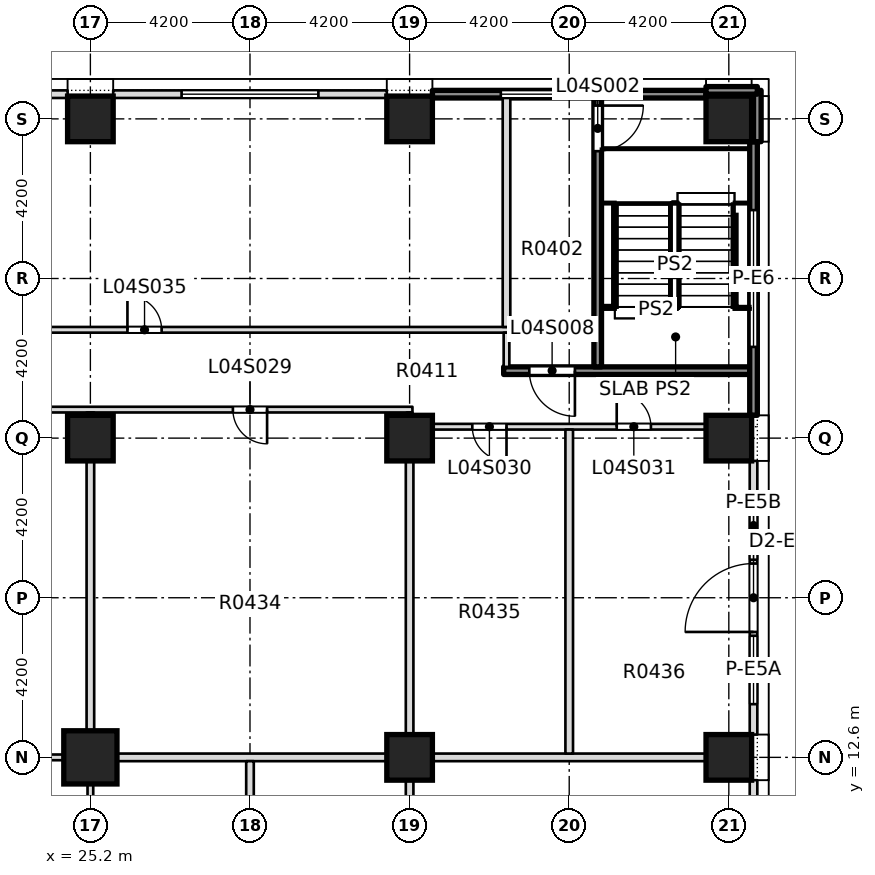
"""IFC4 building model, lengths in metres.
Left out: names, types, materials, properties, quantities, classifications, styles, units other than length and angle.
Written with IfcOpenShell. Run it as: python <this file> out.ifc"""

import sys

from ifc_helpers import new_model, si_unit, direction, frame, frame_2d, origin, origin_2d, place, context, subcontext, project, spatial, rectangle, extrude, element, fill, save


model = new_model("IFC4")
c1 = context("Model", 3, precision=1e-05, world=origin(), true_north=direction((0.0, 1.0)))
c2 = subcontext(c1, "Body", "Model", "MODEL_VIEW")
j1 = project(units=[si_unit("LENGTHUNIT", "METRE"), si_unit("PLANEANGLEUNIT", "RADIAN")], contexts=[c1])
p1 = place(None, origin())
s1 = spatial("IfcSite", under=j1, at=p1, CompositionType="ELEMENT")
p2 = place(p1, origin())
s2 = spatial("IfcBuilding", under=s1, at=p2, CompositionType="ELEMENT")
p3 = place(p2, frame((0.0, 0.0, 25.0)))
s3 = spatial("IfcBuildingStorey", under=s2, at=p3, CompositionType="ELEMENT", Elevation=25.0)
p4 = place(p3, frame((25.2, 12.6, -0.4), z_axis=(0.0, 0.0, 1.0), x_axis=(1.0, 0.0, 0.0)))
e1 = element("IfcColumn", 1, at=p4, inside=s3, PredefinedType="COLUMN", context=c2, shape_type="SweptSolid", body=[
    extrude(rectangle(XDim=1.4, YDim=1.4, at=origin_2d()), origin(), (0.0, 0.0, 1.0), 5.0),
])
for number, where, z_axis, x_axis in (
    (2, (33.6, 12.6, 0.0), (0.0, 0.0, 1.0), (1.0, 0.0, 0.0)),
    (3, (42.0, 12.6, 0.0), (0.0, 0.0, 1.0), (1.0, 0.0, 0.0)),
    (4, (25.2, 21.0, 0.0), (0.0, 0.0, 1.0), (1.0, 0.0, 0.0)),
    (5, (33.6, 21.0, 0.0), (0.0, 0.0, 1.0), (1.0, 0.0, 0.0)),
    (6, (42.0, 21.0, 0.0), (0.0, 0.0, 1.0), (1.0, 0.0, 0.0)),
    (7, (25.2, 29.4, 0.0), (0.0, 0.0, 1.0), (1.0, 0.0, 0.0)),
    (8, (33.6, 29.4, 0.0), (0.0, 0.0, 1.0), (1.0, 0.0, 0.0)),
    (9, (42.0, 29.4, 0.0), (0.0, 0.0, 1.0), (1.0, 0.0, 0.0)),
):
    element("IfcColumn", number, at=place(p3, frame(where, z_axis=z_axis, x_axis=x_axis)), inside=s3, PredefinedType="COLUMN", context=c2, shape_type="SweptSolid", body=[
        extrude(rectangle(XDim=1.2, YDim=1.2, at=origin_2d()), origin(), (0.0, 0.0, 1.0), 5.0),
    ])
p5 = place(p3, frame((16.725, 12.6, 0.0), z_axis=(0.0, 0.0, 1.0), x_axis=(1.0, 0.0, 0.0)))
e10 = element("IfcWall", 10, at=p5, inside=s3, PredefinedType="PARTITIONING", context=c2, shape_type="SweptSolid", body=[
    extrude(rectangle(XDim=8.575, YDim=0.15, at=frame_2d((4.288, 0.0))), origin(), (0.0, 0.0, 1.0), 4.6),
])
p6 = place(p3, frame((25.1, 12.6, 0.0), z_axis=(0.0, 0.0, 1.0), x_axis=(1.0, 0.0, 0.0)))
e11 = element("IfcWall", 11, at=p6, inside=s3, PredefinedType="PARTITIONING", context=c2, shape_type="SweptSolid", body=[
    extrude(rectangle(XDim=17.45, YDim=0.2, at=frame_2d((8.725, 0.0))), origin(), (0.0, 0.0, 1.0), 4.6),
])
p7 = place(p3, frame((33.5, 21.3, 0.0), z_axis=(0.0, 0.0, 1.0), x_axis=(1.0, 0.0, 0.0)))
e12 = element("IfcWall", 12, at=p7, inside=s3, PredefinedType="PARTITIONING", context=c2, shape_type="SweptSolid", body=[
    extrude(rectangle(XDim=9.05, YDim=0.15, at=frame_2d((4.525, 0.0))), origin(), (0.0, 0.0, 1.0), 4.6),
])
p8 = place(p7, frame((1.75, 0.0, 0.0)))
e13 = element("IfcOpeningElement", 13, at=p8, cuts=e12, PredefinedType="OPENING", context=c2, shape_type="SweptSolid", body=[
    extrude(rectangle(XDim=0.9, YDim=2.1, at=frame_2d((0.45, 1.05))), frame((0.0, 0.085, 0.0), z_axis=(0.0, -1.0, 0.0), x_axis=(1.0, 0.0, 0.0)), (0.0, 0.0, 1.0), 0.17),
])
p9 = place(p7, frame((5.55, 0.0, 0.0)))
e14 = element("IfcOpeningElement", 14, at=p9, cuts=e12, PredefinedType="OPENING", context=c2, shape_type="SweptSolid", body=[
    extrude(rectangle(XDim=0.9, YDim=2.1, at=frame_2d((0.45, 1.05))), frame((0.0, 0.085, 0.0), z_axis=(0.0, -1.0, 0.0), x_axis=(1.0, 0.0, 0.0)), (0.0, 0.0, 1.0), 0.17),
])
p10 = place(p3, frame((12.601, 21.75, 0.0), z_axis=(0.0, 0.0, 1.0), x_axis=(1.0, 0.0, 0.0)))
e15 = element("IfcWall", 15, at=p10, inside=s3, PredefinedType="PARTITIONING", context=c2, shape_type="SweptSolid", body=[
    extrude(rectangle(XDim=21.074, YDim=0.15, at=frame_2d((10.537, 0.0))), origin(), (0.0, 0.0, 1.0), 4.6),
])
p11 = place(p10, frame((16.349, 0.0, 0.0)))
e16 = element("IfcOpeningElement", 16, at=p11, cuts=e15, PredefinedType="OPENING", context=c2, shape_type="SweptSolid", body=[
    extrude(rectangle(XDim=0.9, YDim=2.1, at=frame_2d((0.45, 1.05))), frame((0.0, 0.085, 0.0), z_axis=(0.0, -1.0, 0.0), x_axis=(1.0, 0.0, 0.0)), (0.0, 0.0, 1.0), 0.17),
])
p12 = place(p3, frame((36.075, 22.775, 0.0), z_axis=(0.0, 0.0, 1.0), x_axis=(1.0, 0.0, 0.0)))
e17 = element("IfcWall", 17, at=p12, inside=s3, PredefinedType="SOLIDWALL", context=c2, shape_type="SweptSolid", body=[
    extrude(rectangle(XDim=6.475, YDim=0.2, at=frame_2d((3.238, 0.0))), origin(), (0.0, 0.0, 1.0), 4.6),
])
p13 = place(p12, frame((0.675, 0.0, 0.0)))
e18 = element("IfcOpeningElement", 18, at=p13, cuts=e17, PredefinedType="OPENING", context=c2, shape_type="SweptSolid", body=[
    extrude(rectangle(XDim=1.2, YDim=2.1, at=frame_2d((0.6, 1.05))), frame((0.0, 0.11, 0.0), z_axis=(0.0, -1.0, 0.0), x_axis=(1.0, 0.0, 0.0)), (0.0, 0.0, 1.0), 0.22),
])
p14 = place(p3, frame((8.65, 23.85, 0.0), z_axis=(0.0, 0.0, 1.0), x_axis=(1.0, 0.0, 0.0)))
e19 = element("IfcWall", 19, at=p14, inside=s3, PredefinedType="PARTITIONING", context=c2, shape_type="SweptSolid", body=[
    extrude(rectangle(XDim=27.6, YDim=0.15, at=frame_2d((13.8, 0.0))), origin(), (0.0, 0.0, 1.0), 4.6),
])
p15 = place(p14, frame((3.8, 0.0, 0.0)))
e20 = element("IfcOpeningElement", 20, at=p15, cuts=e19, PredefinedType="OPENING", context=c2, shape_type="SweptSolid", body=[
    extrude(rectangle(XDim=0.9, YDim=2.1, at=frame_2d((0.45, 1.05))), frame((0.0, 0.085, 0.0), z_axis=(0.0, -1.0, 0.0), x_axis=(1.0, 0.0, 0.0)), (0.0, 0.0, 1.0), 0.17),
])
p16 = place(p14, frame((17.525, 0.0, 0.0)))
e21 = element("IfcOpeningElement", 21, at=p16, cuts=e19, PredefinedType="OPENING", context=c2, shape_type="SweptSolid", body=[
    extrude(rectangle(XDim=0.9, YDim=2.1, at=frame_2d((0.45, 1.05))), frame((0.0, 0.085, 0.0), z_axis=(0.0, -1.0, 0.0), x_axis=(1.0, 0.0, 0.0)), (0.0, 0.0, 1.0), 0.17),
])
p17 = place(p3, frame((25.2, 2.175, 0.0), z_axis=(0.0, 0.0, 1.0), x_axis=(0.0, 1.0, 0.0)))
e22 = element("IfcWall", 22, at=p17, inside=s3, PredefinedType="PARTITIONING", context=c2, shape_type="SweptSolid", body=[
    extrude(rectangle(XDim=10.325, YDim=0.15, at=frame_2d((5.163, 0.0))), origin(), (0.0, 0.0, 1.0), 4.6),
])
p18 = place(p3, frame((25.2, 12.7, 0.0), z_axis=(0.0, 0.0, 1.0), x_axis=(0.0, 1.0, 0.0)))
e23 = element("IfcWall", 23, at=p18, inside=s3, PredefinedType="PARTITIONING", context=c2, shape_type="SweptSolid", body=[
    extrude(rectangle(XDim=8.975, YDim=0.2, at=frame_2d((4.488, 0.0))), origin(), (0.0, 0.0, 1.0), 4.6),
])
p19 = place(p3, frame((29.4, 2.175, 0.0), z_axis=(0.0, 0.0, 1.0), x_axis=(0.0, 1.0, 0.0)))
e24 = element("IfcWall", 24, at=p19, inside=s3, PredefinedType="PARTITIONING", context=c2, shape_type="SweptSolid", body=[
    extrude(rectangle(XDim=10.325, YDim=0.2, at=frame_2d((5.163, 0.0))), origin(), (0.0, 0.0, 1.0), 4.6),
])
p20 = place(p3, frame((33.6, 2.175, 0.0), z_axis=(0.0, 0.0, 1.0), x_axis=(0.0, 1.0, 0.0)))
e25 = element("IfcWall", 25, at=p20, inside=s3, PredefinedType="PARTITIONING", context=c2, shape_type="SweptSolid", body=[
    extrude(rectangle(XDim=19.05, YDim=0.2, at=frame_2d((9.525, 0.0))), origin(), (0.0, 0.0, 1.0), 4.6),
])
p21 = place(p3, frame((33.6, 21.375, 0.0), z_axis=(0.0, 0.0, 1.0), x_axis=(0.0, 1.0, 0.0)))
e26 = element("IfcWall", 26, at=p21, inside=s3, PredefinedType="PARTITIONING", context=c2, shape_type="SweptSolid", body=[
    extrude(rectangle(XDim=0.3, YDim=0.15, at=frame_2d((0.15, 0.0))), origin(), (0.0, 0.0, 1.0), 4.6),
])
p22 = place(p3, frame((36.15, 22.875, 0.0), z_axis=(0.0, 0.0, 1.0), x_axis=(0.0, 1.0, 0.0)))
e27 = element("IfcWall", 27, at=p22, inside=s3, PredefinedType="PARTITIONING", context=c2, shape_type="SweptSolid", body=[
    extrude(rectangle(XDim=0.9, YDim=0.15, at=frame_2d((0.45, 0.0))), origin(), (0.0, 0.0, 1.0), 4.6),
])
p23 = place(p3, frame((36.15, 23.925, 0.0), z_axis=(0.0, 0.0, 1.0), x_axis=(0.0, 1.0, 0.0)))
e28 = element("IfcWall", 28, at=p23, inside=s3, PredefinedType="PARTITIONING", context=c2, shape_type="SweptSolid", body=[
    extrude(rectangle(XDim=6.025, YDim=0.2, at=frame_2d((3.012, 0.0))), origin(), (0.0, 0.0, 1.0), 4.6),
])
p24 = place(p3, frame((37.8, 12.7, 0.0), z_axis=(0.0, 0.0, 1.0), x_axis=(0.0, 1.0, 0.0)))
e29 = element("IfcWall", 29, at=p24, inside=s3, PredefinedType="PARTITIONING", context=c2, shape_type="SweptSolid", body=[
    extrude(rectangle(XDim=8.525, YDim=0.2, at=frame_2d((4.263, 0.0))), origin(), (0.0, 0.0, 1.0), 4.6),
])
p25 = place(p3, frame((38.55, 22.875, 0.0), z_axis=(0.0, 0.0, 1.0), x_axis=(0.0, 1.0, 0.0)))
e30 = element("IfcWall", 30, at=p25, inside=s3, PredefinedType="SOLIDWALL", context=c2, shape_type="SweptSolid", body=[
    extrude(rectangle(XDim=7.075, YDim=0.2, at=frame_2d((3.538, 0.0))), origin(), (0.0, 0.0, 1.0), 4.6),
])
p26 = place(p25, frame((5.675, 0.0, 0.0)))
e31 = element("IfcOpeningElement", 31, at=p26, cuts=e30, PredefinedType="OPENING", context=c2, shape_type="SweptSolid", body=[
    extrude(rectangle(XDim=1.2, YDim=2.1, at=frame_2d((0.6, 1.05))), frame((0.0, 0.11, 0.0), z_axis=(0.0, -1.0, 0.0), x_axis=(1.0, 0.0, 0.0)), (0.0, 0.0, 1.0), 0.22),
])
p27 = place(p3, frame((42.65, 4.8, 0.0), z_axis=(0.0, 0.0, 1.0), x_axis=(0.0, 1.0, 0.0)))
e32 = element("IfcWall", 32, at=p27, inside=s3, PredefinedType="STANDARD", context=c2, shape_type="SweptSolid", body=[
    extrude(rectangle(XDim=7.2, YDim=0.2, at=frame_2d((3.6, 0.0))), origin(), (0.0, 0.0, 1.0), 4.6),
])
p28 = place(p27, frame((1.8, 0.0, 0.9)))
e33 = element("IfcOpeningElement", 33, at=p28, cuts=e32, PredefinedType="OPENING", context=c2, shape_type="SweptSolid", body=[
    extrude(rectangle(XDim=3.6, YDim=2.8, at=frame_2d((1.8, 1.4))), frame((0.0, 0.11, 0.0), z_axis=(0.0, -1.0, 0.0), x_axis=(1.0, 0.0, 0.0)), (0.0, 0.0, 1.0), 0.22),
])
p29 = place(p3, frame((42.65, 13.2, 0.0), z_axis=(0.0, 0.0, 1.0), x_axis=(0.0, 1.0, 0.0)))
e34 = element("IfcWall", 34, at=p29, inside=s3, PredefinedType="STANDARD", context=c2, shape_type="SweptSolid", body=[
    extrude(rectangle(XDim=7.2, YDim=0.2, at=frame_2d((3.6, 0.0))), origin(), (0.0, 0.0, 1.0), 4.6),
])
p30 = place(p29, frame((0.8, 0.0, 0.9)))
e35 = element("IfcOpeningElement", 35, at=p30, cuts=e34, PredefinedType="OPENING", context=c2, shape_type="SweptSolid", body=[
    extrude(rectangle(XDim=1.8, YDim=2.8, at=frame_2d((0.9, 1.4))), frame((0.0, 0.11, 0.0), z_axis=(0.0, -1.0, 0.0), x_axis=(1.0, 0.0, 0.0)), (0.0, 0.0, 1.0), 0.22),
])
p31 = place(p29, frame((2.7, 0.0, 0.0)))
e36 = element("IfcOpeningElement", 36, at=p31, cuts=e34, PredefinedType="OPENING", context=c2, shape_type="SweptSolid", body=[
    extrude(rectangle(XDim=1.8, YDim=2.4, at=frame_2d((0.9, 1.2))), frame((0.0, 0.11, 0.0), z_axis=(0.0, -1.0, 0.0), x_axis=(1.0, 0.0, 0.0)), (0.0, 0.0, 1.0), 0.22),
])
p32 = place(p29, frame((4.6, 0.0, 0.9)))
e37 = element("IfcOpeningElement", 37, at=p32, cuts=e34, PredefinedType="OPENING", context=c2, shape_type="SweptSolid", body=[
    extrude(rectangle(XDim=1.8, YDim=2.8, at=frame_2d((0.9, 1.4))), frame((0.0, 0.11, 0.0), z_axis=(0.0, -1.0, 0.0), x_axis=(1.0, 0.0, 0.0)), (0.0, 0.0, 1.0), 0.22),
])
p33 = place(p3, frame((42.65, 21.6, 0.0), z_axis=(0.0, 0.0, 1.0), x_axis=(0.0, 1.0, 0.0)))
e38 = element("IfcWall", 38, at=p33, inside=s3, PredefinedType="SOLIDWALL", context=c2, shape_type="SweptSolid", body=[
    extrude(rectangle(XDim=7.2, YDim=0.2, at=frame_2d((3.6, 0.0))), origin(), (0.0, 0.0, 1.0), 4.6),
])
p34 = place(p33, frame((1.8, 0.0, 0.9)))
e39 = element("IfcOpeningElement", 39, at=p34, cuts=e38, PredefinedType="OPENING", context=c2, shape_type="SweptSolid", body=[
    extrude(rectangle(XDim=3.6, YDim=2.8, at=frame_2d((1.8, 1.4))), frame((0.0, 0.11, 0.0), z_axis=(0.0, -1.0, 0.0), x_axis=(1.0, 0.0, 0.0)), (0.0, 0.0, 1.0), 0.22),
])
p35 = place(p3, frame((34.2, 30.05, 0.0), z_axis=(0.0, 0.0, 1.0), x_axis=(1.0, 0.0, 0.0)))
e40 = element("IfcWall", 40, at=p35, inside=s3, PredefinedType="SOLIDWALL", context=c2, shape_type="SweptSolid", body=[
    extrude(rectangle(XDim=7.2, YDim=0.2, at=frame_2d((3.6, 0.0))), origin(), (0.0, 0.0, 1.0), 4.6),
])
p36 = place(p35, frame((1.8, 0.0, 0.9)))
e41 = element("IfcOpeningElement", 41, at=p36, cuts=e40, PredefinedType="OPENING", context=c2, shape_type="SweptSolid", body=[
    extrude(rectangle(XDim=3.6, YDim=2.8, at=frame_2d((1.8, 1.4))), frame((0.0, 0.11, 0.0), z_axis=(0.0, -1.0, 0.0), x_axis=(1.0, 0.0, 0.0)), (0.0, 0.0, 1.0), 0.22),
])
p37 = place(p3, frame((33.0, 30.05, 0.0), z_axis=(0.0, 0.0, 1.0), x_axis=(-1.0, 0.0, 0.0)))
e42 = element("IfcWall", 42, at=p37, inside=s3, PredefinedType="STANDARD", context=c2, shape_type="SweptSolid", body=[
    extrude(rectangle(XDim=7.2, YDim=0.2, at=frame_2d((3.6, 0.0))), origin(), (0.0, 0.0, 1.0), 4.6),
])
p38 = place(p37, frame((1.8, 0.0, 0.9)))
e43 = element("IfcOpeningElement", 43, at=p38, cuts=e42, PredefinedType="OPENING", context=c2, shape_type="SweptSolid", body=[
    extrude(rectangle(XDim=3.6, YDim=2.8, at=frame_2d((1.8, 1.4))), frame((0.0, 0.11, 0.0), z_axis=(0.0, -1.0, 0.0), x_axis=(1.0, 0.0, 0.0)), (0.0, 0.0, 1.0), 0.22),
])
p39 = place(p3, frame((24.6, 30.05, 0.0), z_axis=(0.0, 0.0, 1.0), x_axis=(-1.0, 0.0, 0.0)))
e44 = element("IfcWall", 44, at=p39, inside=s3, PredefinedType="STANDARD", context=c2, shape_type="SweptSolid", body=[
    extrude(rectangle(XDim=7.2, YDim=0.2, at=frame_2d((3.6, 0.0))), origin(), (0.0, 0.0, 1.0), 4.6),
])
p40 = place(p39, frame((1.8, 0.0, 0.9)))
e45 = element("IfcOpeningElement", 45, at=p40, cuts=e44, PredefinedType="OPENING", context=c2, shape_type="SweptSolid", body=[
    extrude(rectangle(XDim=3.6, YDim=2.8, at=frame_2d((1.8, 1.4))), frame((0.0, 0.11, 0.0), z_axis=(0.0, -1.0, 0.0), x_axis=(1.0, 0.0, 0.0)), (0.0, 0.0, 1.0), 0.22),
])
p41 = place(p3, frame((42.75, 28.8, 0.0), z_axis=(0.0, 0.0, 1.0), x_axis=(0.0, 1.0, 0.0)))
e46 = element("IfcWall", 46, at=p41, inside=s3, PredefinedType="SOLIDWALL", context=c2, shape_type="SweptSolid", body=[
    extrude(rectangle(XDim=1.35, YDim=0.2, at=frame_2d((0.675, 0.0))), origin(), (0.0, 0.0, 1.0), 4.6),
])
p42 = place(p3, frame((41.4, 30.15, 0.0), z_axis=(0.0, 0.0, 1.0), x_axis=(1.0, 0.0, 0.0)))
e47 = element("IfcWall", 47, at=p42, inside=s3, PredefinedType="SOLIDWALL", context=c2, shape_type="SweptSolid", body=[
    extrude(rectangle(XDim=1.35, YDim=0.2, at=frame_2d((0.675, 0.0))), origin(), (0.0, 0.0, 1.0), 4.6),
])
p43 = place(p26, origin())
e48 = element("IfcDoor", 48, at=p43, inside=s3, OperationType="DOUBLE_DOOR_SINGLE_SWING", PredefinedType="DOOR", context=c2, shape_type="SweptSolid", body=[
    extrude(rectangle(XDim=1.2, YDim=2.1, at=frame_2d((0.6, 1.05))), frame((0.0, 0.025, 0.0), z_axis=(0.0, -1.0, 0.0), x_axis=(1.0, 0.0, 0.0)), (0.0, 0.0, 1.0), 0.05),
])
fill(e31, e48)
p44 = place(p13, origin())
e49 = element("IfcDoor", 49, at=p44, inside=s3, OperationType="SINGLE_SWING_LEFT", PredefinedType="DOOR", context=c2, shape_type="SweptSolid", body=[
    extrude(rectangle(XDim=1.2, YDim=2.1, at=frame_2d((0.6, 1.05))), frame((0.0, 0.025, 0.0), z_axis=(0.0, -1.0, 0.0), x_axis=(1.0, 0.0, 0.0)), (0.0, 0.0, 1.0), 0.05),
])
fill(e18, e49)
p45 = place(p11, origin())
e50 = element("IfcDoor", 50, at=p45, inside=s3, OperationType="SINGLE_SWING_RIGHT", PredefinedType="DOOR", context=c2, shape_type="SweptSolid", body=[
    extrude(rectangle(XDim=0.9, YDim=2.1, at=frame_2d((0.45, 1.05))), frame((0.0, 0.025, 0.0), z_axis=(0.0, -1.0, 0.0), x_axis=(1.0, 0.0, 0.0)), (0.0, 0.0, 1.0), 0.05),
])
fill(e16, e50)
p46 = place(p8, origin())
e51 = element("IfcDoor", 51, at=p46, inside=s3, OperationType="SINGLE_SWING_LEFT", PredefinedType="DOOR", context=c2, shape_type="SweptSolid", body=[
    extrude(rectangle(XDim=0.9, YDim=2.1, at=frame_2d((0.45, 1.05))), frame((0.0, 0.025, 0.0), z_axis=(0.0, -1.0, 0.0), x_axis=(1.0, 0.0, 0.0)), (0.0, 0.0, 1.0), 0.05),
])
fill(e13, e51)
p47 = place(p9, origin())
e52 = element("IfcDoor", 52, at=p47, inside=s3, OperationType="SINGLE_SWING_LEFT", PredefinedType="DOOR", context=c2, shape_type="SweptSolid", body=[
    extrude(rectangle(XDim=0.9, YDim=2.1, at=frame_2d((0.45, 1.05))), frame((0.0, 0.025, 0.0), z_axis=(0.0, -1.0, 0.0), x_axis=(1.0, 0.0, 0.0)), (0.0, 0.0, 1.0), 0.05),
])
fill(e14, e52)
p48 = place(p16, origin())
e53 = element("IfcDoor", 53, at=p48, inside=s3, OperationType="SINGLE_SWING_RIGHT", PredefinedType="DOOR", context=c2, shape_type="SweptSolid", body=[
    extrude(rectangle(XDim=0.9, YDim=2.1, at=frame_2d((0.45, 1.05))), frame((0.0, 0.025, 0.0), z_axis=(0.0, -1.0, 0.0), x_axis=(1.0, 0.0, 0.0)), (0.0, 0.0, 1.0), 0.05),
])
fill(e21, e53)
p49 = place(p30, origin())
e54 = element("IfcWindow", 54, at=p49, inside=s3, PartitioningType="SINGLE_PANEL", PredefinedType="WINDOW", context=c2, shape_type="SweptSolid", body=[
    extrude(rectangle(XDim=1.8, YDim=2.8, at=frame_2d((0.9, 1.4))), frame((0.0, 0.03, 0.0), z_axis=(0.0, -1.0, 0.0), x_axis=(1.0, 0.0, 0.0)), (0.0, 0.0, 1.0), 0.06),
])
fill(e35, e54)
p50 = place(p31, origin())
e55 = element("IfcDoor", 55, at=p50, inside=s3, OperationType="SINGLE_SWING_LEFT", PredefinedType="DOOR", context=c2, shape_type="SweptSolid", body=[
    extrude(rectangle(XDim=1.8, YDim=2.4, at=frame_2d((0.9, 1.2))), frame((0.0, 0.025, 0.0), z_axis=(0.0, -1.0, 0.0), x_axis=(1.0, 0.0, 0.0)), (0.0, 0.0, 1.0), 0.05),
])
fill(e36, e55)
p51 = place(p32, origin())
e56 = element("IfcWindow", 56, at=p51, inside=s3, PartitioningType="SINGLE_PANEL", PredefinedType="WINDOW", context=c2, shape_type="SweptSolid", body=[
    extrude(rectangle(XDim=1.8, YDim=2.8, at=frame_2d((0.9, 1.4))), frame((0.0, 0.03, 0.0), z_axis=(0.0, -1.0, 0.0), x_axis=(1.0, 0.0, 0.0)), (0.0, 0.0, 1.0), 0.06),
])
fill(e37, e56)
p52 = place(p34, origin())
e57 = element("IfcWindow", 57, at=p52, inside=s3, PartitioningType="SINGLE_PANEL", PredefinedType="WINDOW", context=c2, shape_type="SweptSolid", body=[
    extrude(rectangle(XDim=3.6, YDim=2.8, at=frame_2d((1.8, 1.4))), frame((0.0, 0.03, 0.0), z_axis=(0.0, -1.0, 0.0), x_axis=(1.0, 0.0, 0.0)), (0.0, 0.0, 1.0), 0.06),
])
fill(e39, e57)
p53 = place(p36, origin())
e58 = element("IfcWindow", 58, at=p53, inside=s3, PartitioningType="SINGLE_PANEL", PredefinedType="WINDOW", context=c2, shape_type="SweptSolid", body=[
    extrude(rectangle(XDim=3.6, YDim=2.8, at=frame_2d((1.8, 1.4))), frame((0.0, 0.03, 0.0), z_axis=(0.0, -1.0, 0.0), x_axis=(1.0, 0.0, 0.0)), (0.0, 0.0, 1.0), 0.06),
])
fill(e41, e58)
p54 = place(p38, origin())
e59 = element("IfcWindow", 59, at=p54, inside=s3, PartitioningType="SINGLE_PANEL", PredefinedType="WINDOW", context=c2, shape_type="SweptSolid", body=[
    extrude(rectangle(XDim=3.6, YDim=2.8, at=frame_2d((1.8, 1.4))), frame((0.0, 0.03, 0.0), z_axis=(0.0, -1.0, 0.0), x_axis=(1.0, 0.0, 0.0)), (0.0, 0.0, 1.0), 0.06),
])
fill(e43, e59)
save(model, sys.argv[1])
